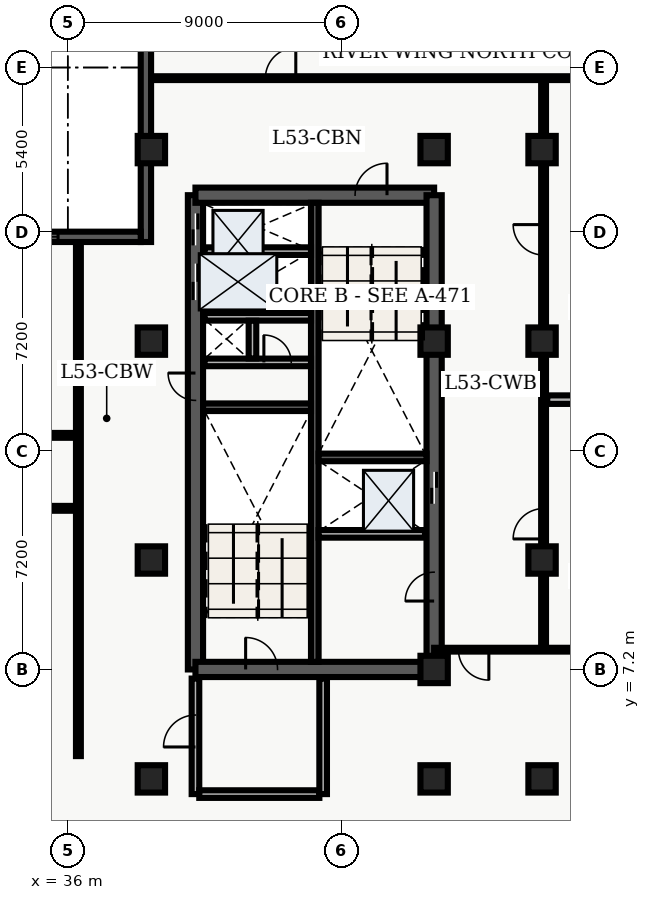
"""IFC4 building model, lengths in metres.
Left out: names, types, materials, properties, quantities, classifications, styles, units other than length and angle.
Written with IfcOpenShell. Run it as: python <this file> out.ifc"""

import sys

from ifc_helpers import new_model, entity, si_unit, converted_unit, direction, frame, origin_with_axes, origin_2d_with_axis, place, context, subcontext, project, spatial, polyline, rectangle, outline, extrude, element, fill, save


model = new_model("IFC4")
c1 = context("Model", 3, precision=1e-05, world=origin_with_axes(), true_north=direction((0.0, 1.0)))
c2 = subcontext(c1, "Body", "Model", "MODEL_VIEW")
j1 = project(units=[si_unit("LENGTHUNIT", "METRE"), converted_unit("PLANEANGLEUNIT", "DEGREE", entity("IfcPlaneAngleMeasure", 0.017), si_unit("PLANEANGLEUNIT", "RADIAN"), dimensions=[0, 0, 0, 0, 0, 0, 0])], contexts=[c1])
p1 = place(None, origin_with_axes())
s1 = spatial("IfcSite", under=j1, at=p1, CompositionType="ELEMENT")
p2 = place(p1, origin_with_axes())
s2 = spatial("IfcBuilding", under=s1, at=p2, CompositionType="ELEMENT")
p3 = place(p2, frame((0.0, 0.0, 216.0), z_axis=(0.0, 0.0, 1.0), x_axis=(1.0, 0.0, 0.0)))
s3 = spatial("IfcBuildingStorey", under=s2, at=p3, CompositionType="ELEMENT", Elevation=216.0)
p4 = place(p3, frame((40.2, 7.2, 0.0), z_axis=(0.0, 0.0, 1.0), x_axis=(0.0, 1.0, 0.0)))
e1 = element("IfcWall", 1, at=p4, inside=s3, PredefinedType="SHEAR", context=c2, shape_type="SweptSolid", body=[
    extrude(outline(polyline([(0.0, -0.25), (15.6, -0.25), (15.6, 0.25), (0.0, 0.25), (0.0, -0.25)])), origin_with_axes(), (0.0, 0.0, 1.0), 3.6),
])
p5 = place(p4, frame((14.475, 0.0, 0.0), z_axis=(0.0, 0.0, 1.0), x_axis=(1.0, 0.0, 0.0)))
e2 = element("IfcOpeningElement", 2, at=p5, cuts=e1, PredefinedType="OPENING", context=c2, shape_type="SweptSolid", body=[
    extrude(rectangle(XDim=1.05, YDim=0.52, at=origin_2d_with_axis()), origin_with_axes(), (0.0, 0.0, 1.0), 2.15),
])
p6 = place(p4, frame((12.75, 0.0, 0.0), z_axis=(0.0, 0.0, 1.0), x_axis=(1.0, 0.0, 0.0)))
e3 = element("IfcOpeningElement", 3, at=p6, cuts=e1, PredefinedType="OPENING", context=c2, shape_type="SweptSolid", body=[
    extrude(rectangle(XDim=1.2, YDim=0.52, at=origin_2d_with_axis()), origin_with_axes(), (0.0, 0.0, 1.0), 2.15),
])
p7 = place(p4, frame((9.3, 0.0, 0.0), z_axis=(0.0, 0.0, 1.0), x_axis=(1.0, 0.0, 0.0)))
e4 = element("IfcOpeningElement", 4, at=p7, cuts=e1, PredefinedType="OPENING", context=c2, shape_type="SweptSolid", body=[
    extrude(rectangle(XDim=0.9, YDim=0.52, at=origin_2d_with_axis()), origin_with_axes(), (0.0, 0.0, 1.0), 2.15),
])
p8 = place(p3, frame((40.2, 7.2, 0.0), z_axis=(0.0, 0.0, 1.0), x_axis=(1.0, 0.0, 0.0)))
e5 = element("IfcWall", 5, at=p8, inside=s3, PredefinedType="SHEAR", context=c2, shape_type="SweptSolid", body=[
    extrude(outline(polyline([(0.0, -0.25), (7.85, -0.25), (7.85, 0.25), (0.0, 0.25), (0.0, -0.25)])), origin_with_axes(), (0.0, 0.0, 1.0), 3.6),
])
p9 = place(p8, frame((2.175, 0.0, 0.0), z_axis=(0.0, 0.0, 1.0), x_axis=(1.0, 0.0, 0.0)))
e6 = element("IfcOpeningElement", 6, at=p9, cuts=e5, PredefinedType="OPENING", context=c2, shape_type="SweptSolid", body=[
    extrude(rectangle(XDim=1.05, YDim=0.52, at=origin_2d_with_axis()), origin_with_axes(), (0.0, 0.0, 1.0), 2.15),
])
p10 = place(p3, frame((40.2, 22.8, 0.0), z_axis=(0.0, 0.0, 1.0), x_axis=(1.0, 0.0, 0.0)))
e7 = element("IfcWall", 7, at=p10, inside=s3, PredefinedType="SHEAR", context=c2, shape_type="SweptSolid", body=[
    extrude(outline(polyline([(0.0, -0.25), (7.85, -0.25), (7.85, 0.25), (0.0, 0.25), (0.0, -0.25)])), origin_with_axes(), (0.0, 0.0, 1.0), 3.6),
])
p11 = place(p10, frame((5.775, 0.0, 0.0), z_axis=(0.0, 0.0, 1.0), x_axis=(1.0, 0.0, 0.0)))
e8 = element("IfcOpeningElement", 8, at=p11, cuts=e7, PredefinedType="OPENING", context=c2, shape_type="SweptSolid", body=[
    extrude(rectangle(XDim=1.05, YDim=0.52, at=origin_2d_with_axis()), origin_with_axes(), (0.0, 0.0, 1.0), 2.15),
])
p12 = place(p3, frame((48.05, 7.2, 0.0), z_axis=(0.0, 0.0, 1.0), x_axis=(0.0, 1.0, 0.0)))
e9 = element("IfcWall", 9, at=p12, inside=s3, PredefinedType="SHEAR", context=c2, shape_type="SweptSolid", body=[
    extrude(outline(polyline([(0.0, -0.25), (15.6, -0.25), (15.6, 0.25), (0.0, 0.25), (0.0, -0.25)])), origin_with_axes(), (0.0, 0.0, 1.0), 3.6),
])
p13 = place(p12, frame((5.975, 0.0, 0.0), z_axis=(0.0, 0.0, 1.0), x_axis=(1.0, 0.0, 0.0)))
e10 = element("IfcOpeningElement", 10, at=p13, cuts=e9, PredefinedType="OPENING", context=c2, shape_type="SweptSolid", body=[
    extrude(rectangle(XDim=1.05, YDim=0.52, at=origin_2d_with_axis()), origin_with_axes(), (0.0, 0.0, 1.0), 2.15),
])
p14 = place(p12, frame((2.725, 0.0, 0.0), z_axis=(0.0, 0.0, 1.0), x_axis=(1.0, 0.0, 0.0)))
e11 = element("IfcOpeningElement", 11, at=p14, cuts=e9, PredefinedType="OPENING", context=c2, shape_type="SweptSolid", body=[
    extrude(rectangle(XDim=0.95, YDim=0.52, at=origin_2d_with_axis()), origin_with_axes(), (0.0, 0.0, 1.0), 2.15),
])
p15 = place(p3, frame((44.125, 7.45, 0.0), z_axis=(0.0, 0.0, 1.0), x_axis=(0.0, 1.0, 0.0)))
e12 = element("IfcWall", 12, at=p15, inside=s3, PredefinedType="SHEAR", context=c2, shape_type="SweptSolid", body=[
    extrude(outline(polyline([(0.0, -0.125), (15.1, -0.125), (15.1, 0.125), (0.0, 0.125), (0.0, -0.125)])), origin_with_axes(), (0.0, 0.0, 1.0), 3.6),
])
for number, where, z_axis, x_axis in (
    (13, (40.45, 15.825, 0.0), (0.0, 0.0, 1.0), (1.0, 0.0, 0.0)),
    (14, (44.25, 14.175, 0.0), (0.0, 0.0, 1.0), (1.0, 0.0, 0.0)),
):
    element("IfcWall", number, at=place(p3, frame(where, z_axis=z_axis, x_axis=x_axis)), inside=s3, PredefinedType="SHEAR", context=c2, shape_type="SweptSolid", body=[
        extrude(outline(polyline([(0.0, -0.125), (3.55, -0.125), (3.55, 0.125), (0.0, 0.125), (0.0, -0.125)])), origin_with_axes(), (0.0, 0.0, 1.0), 3.6),
    ])
p16 = place(p3, frame((40.5, 17.3, 0.0), z_axis=(0.0, 0.0, 1.0), x_axis=(1.0, 0.0, 0.0)))
e15 = element("IfcWall", 15, at=p16, inside=s3, PredefinedType="SOLIDWALL", context=c2, shape_type="SweptSolid", body=[
    extrude(outline(polyline([(0.0, -0.125), (3.5, -0.125), (3.5, 0.125), (0.0, 0.125), (0.0, -0.125)])), origin_with_axes(), (0.0, 0.0, 1.0), 2.64),
])
p17 = place(p16, frame((2.4, 0.0, 0.0), z_axis=(0.0, 0.0, 1.0), x_axis=(1.0, 0.0, 0.0)))
e16 = element("IfcOpeningElement", 16, at=p17, cuts=e15, PredefinedType="OPENING", context=c2, shape_type="SweptSolid", body=[
    extrude(rectangle(XDim=0.9, YDim=0.27, at=origin_2d_with_axis()), origin_with_axes(), (0.0, 0.0, 1.0), 2.15),
])
p18 = place(p3, frame((40.5, 18.8, 0.0), z_axis=(0.0, 0.0, 1.0), x_axis=(1.0, 0.0, 0.0)))
e17 = element("IfcWall", 17, at=p18, inside=s3, PredefinedType="SOLIDWALL", context=c2, shape_type="SweptSolid", body=[
    extrude(outline(polyline([(0.0, -0.125), (3.5, -0.125), (3.5, 0.125), (0.0, 0.125), (0.0, -0.125)])), origin_with_axes(), (0.0, 0.0, 1.0), 2.64),
])
p19 = place(p3, frame((42.075, 17.43, 0.0), z_axis=(0.0, 0.0, 1.0), x_axis=(0.0, 1.0, 0.0)))
e18 = element("IfcWall", 18, at=p19, inside=s3, PredefinedType="SOLIDWALL", context=c2, shape_type="SweptSolid", body=[
    extrude(outline(polyline([(0.0, -0.125), (1.24, -0.125), (1.24, 0.125), (0.0, 0.125), (0.0, -0.125)])), origin_with_axes(), (0.0, 0.0, 1.0), 2.64),
])
p20 = place(p3, frame((40.2, 3.1, 0.0), z_axis=(0.0, 0.0, 1.0), x_axis=(0.0, 1.0, 0.0)))
e19 = element("IfcWall", 19, at=p20, inside=s3, PredefinedType="SOLIDWALL", context=c2, shape_type="SweptSolid", body=[
    extrude(outline(polyline([(0.0, -0.125), (3.8, -0.125), (3.8, 0.125), (0.0, 0.125), (0.0, -0.125)])), origin_with_axes(), (0.0, 0.0, 1.0), 2.64),
])
p21 = place(p20, frame((2.075, 0.0, 0.0), z_axis=(0.0, 0.0, 1.0), x_axis=(1.0, 0.0, 0.0)))
e20 = element("IfcOpeningElement", 20, at=p21, cuts=e19, PredefinedType="OPENING", context=c2, shape_type="SweptSolid", body=[
    extrude(rectangle(XDim=1.05, YDim=0.27, at=origin_2d_with_axis()), origin_with_axes(), (0.0, 0.0, 1.0), 2.15),
])
p22 = place(p3, frame((40.325, 3.1, 0.0), z_axis=(0.0, 0.0, 1.0), x_axis=(1.0, 0.0, 0.0)))
e21 = element("IfcWall", 21, at=p22, inside=s3, PredefinedType="SOLIDWALL", context=c2, shape_type="SweptSolid", body=[
    extrude(outline(polyline([(0.0, -0.125), (3.95, -0.125), (3.95, 0.125), (0.0, 0.125), (0.0, -0.125)])), origin_with_axes(), (0.0, 0.0, 1.0), 2.64),
])
p23 = place(p3, frame((44.4, 3.1, 0.0), z_axis=(0.0, 0.0, 1.0), x_axis=(0.0, 1.0, 0.0)))
e22 = element("IfcWall", 22, at=p23, inside=s3, PredefinedType="SOLIDWALL", context=c2, shape_type="SweptSolid", body=[
    extrude(outline(polyline([(0.0, -0.125), (3.8, -0.125), (3.8, 0.125), (0.0, 0.125), (0.0, -0.125)])), origin_with_axes(), (0.0, 0.0, 1.0), 2.64),
])
for number, where, z_axis, x_axis in (
    (23, (38.75, 3.6, 0.0), (0.0, 0.0, 1.0), (1.0, 0.0, 0.0)),
    (24, (38.75, 10.8, 0.0), (0.0, 0.0, 1.0), (1.0, 0.0, 0.0)),
    (25, (38.75, 18.0, 0.0), (0.0, 0.0, 1.0), (1.0, 0.0, 0.0)),
    (26, (38.75, 24.3, 0.0), (0.0, 0.0, 1.0), (1.0, 0.0, 0.0)),
    (27, (48.05, 3.6, 0.0), (0.0, 0.0, 1.0), (1.0, 0.0, 0.0)),
    (28, (48.05, 7.2, 0.0), (0.0, 0.0, 1.0), (1.0, 0.0, 0.0)),
    (29, (48.05, 18.0, 0.0), (0.0, 0.0, 1.0), (1.0, 0.0, 0.0)),
    (30, (48.05, 24.3, 0.0), (0.0, 0.0, 1.0), (1.0, 0.0, 0.0)),
    (31, (51.6, 3.6, 0.0), (0.0, 0.0, 1.0), (1.0, 0.0, 0.0)),
    (32, (51.6, 10.8, 0.0), (0.0, 0.0, 1.0), (1.0, 0.0, 0.0)),
    (33, (51.6, 18.0, 0.0), (0.0, 0.0, 1.0), (1.0, 0.0, 0.0)),
    (34, (51.6, 24.3, 0.0), (0.0, 0.0, 1.0), (1.0, 0.0, 0.0)),
):
    element("IfcColumn", number, at=place(p3, frame(where, z_axis=z_axis, x_axis=x_axis)), inside=s3, PredefinedType="COLUMN", context=c2, shape_type="SweptSolid", body=[
        extrude(rectangle(XDim=0.9, YDim=0.9, at=origin_2d_with_axis()), origin_with_axes(), (0.0, 0.0, 1.0), 3.9),
    ])
for number, where, z_axis, x_axis in (
    (35, (40.5, 20.96, 0.0), (0.0, 0.0, 1.0), (1.0, 0.0, 0.0)),
    (36, (44.25, 11.66, 0.0), (0.0, 0.0, 1.0), (1.0, 0.0, 0.0)),
):
    element("IfcWall", number, at=place(p3, frame(where, z_axis=z_axis, x_axis=x_axis)), inside=s3, PredefinedType="SOLIDWALL", context=c2, shape_type="SweptSolid", body=[
        extrude(outline(polyline([(0.0, -0.125), (3.5, -0.125), (3.5, 0.125), (0.0, 0.125), (0.0, -0.125)])), origin_with_axes(), (0.0, 0.0, 1.0), 2.64),
    ])
p24 = place(p3, frame((21.15, 12.5, 0.0), z_axis=(0.0, 0.0, 1.0), x_axis=(1.0, 0.0, 0.0)))
e37 = element("IfcWall", 37, at=p24, inside=s3, PredefinedType="PARTITIONING", context=c2, shape_type="SweptSolid", body=[
    extrude(outline(polyline([(0.0, -0.08), (15.2, -0.08), (15.2, 0.08), (0.0, 0.08), (0.0, -0.08)])), origin_with_axes(), (0.0, 0.0, 1.0), 2.64),
])
p25 = place(p24, frame((7.65, 0.0, 0.0), z_axis=(0.0, 0.0, 1.0), x_axis=(1.0, 0.0, 0.0)))
e38 = element("IfcOpeningElement", 38, at=p25, cuts=e37, PredefinedType="OPENING", context=c2, shape_type="SweptSolid", body=[
    extrude(rectangle(XDim=1.2, YDim=0.18, at=origin_2d_with_axis()), origin_with_axes(), (0.0, 0.0, 1.0), 2.2),
])
p26 = place(p3, frame((21.15, 14.9, 0.0), z_axis=(0.0, 0.0, 1.0), x_axis=(1.0, 0.0, 0.0)))
e39 = element("IfcWall", 39, at=p26, inside=s3, PredefinedType="PARTITIONING", context=c2, shape_type="SweptSolid", body=[
    extrude(outline(polyline([(0.0, -0.08), (15.2, -0.08), (15.2, 0.08), (0.0, 0.08), (0.0, -0.08)])), origin_with_axes(), (0.0, 0.0, 1.0), 2.64),
])
p27 = place(p26, frame((1.964, 0.0, 0.0), z_axis=(0.0, 0.0, 1.0), x_axis=(1.0, 0.0, 0.0)))
e40 = element("IfcOpeningElement", 40, at=p27, cuts=e39, PredefinedType="OPENING", context=c2, shape_type="SweptSolid", body=[
    extrude(rectangle(XDim=1.0, YDim=0.18, at=origin_2d_with_axis()), origin_with_axes(), (0.0, 0.0, 1.0), 2.15),
])
p28 = place(p26, frame((5.099, 0.0, 0.0), z_axis=(0.0, 0.0, 1.0), x_axis=(1.0, 0.0, 0.0)))
e41 = element("IfcOpeningElement", 41, at=p28, cuts=e39, PredefinedType="OPENING", context=c2, shape_type="SweptSolid", body=[
    extrude(rectangle(XDim=1.0, YDim=0.18, at=origin_2d_with_axis()), origin_with_axes(), (0.0, 0.0, 1.0), 2.15),
])
p29 = place(p26, frame((9.279, 0.0, 0.0), z_axis=(0.0, 0.0, 1.0), x_axis=(1.0, 0.0, 0.0)))
e42 = element("IfcOpeningElement", 42, at=p29, cuts=e39, PredefinedType="OPENING", context=c2, shape_type="SweptSolid", body=[
    extrude(rectangle(XDim=1.0, YDim=0.18, at=origin_2d_with_axis()), origin_with_axes(), (0.0, 0.0, 1.0), 2.15),
])
p30 = place(p26, frame((13.614, 0.0, 0.0), z_axis=(0.0, 0.0, 1.0), x_axis=(1.0, 0.0, 0.0)))
e43 = element("IfcOpeningElement", 43, at=p30, cuts=e39, PredefinedType="OPENING", context=c2, shape_type="SweptSolid", body=[
    extrude(rectangle(XDim=1.0, YDim=0.18, at=origin_2d_with_axis()), origin_with_axes(), (0.0, 0.0, 1.0), 2.15),
])
p31 = place(p3, frame((36.35, 4.35, 0.0), z_axis=(0.0, 0.0, 1.0), x_axis=(0.0, 1.0, 0.0)))
e44 = element("IfcWall", 44, at=p31, inside=s3, PredefinedType="PARTITIONING", context=c2, shape_type="SweptSolid", body=[
    extrude(outline(polyline([(0.0, -0.08), (16.95, -0.08), (16.95, 0.08), (0.0, 0.08), (0.0, -0.08)])), origin_with_axes(), (0.0, 0.0, 1.0), 2.64),
])
p32 = place(p3, frame((51.65, 7.85, 0.0), z_axis=(0.0, 0.0, 1.0), x_axis=(0.0, 1.0, 0.0)))
e45 = element("IfcWall", 45, at=p32, inside=s3, PredefinedType="PARTITIONING", context=c2, shape_type="SweptSolid", body=[
    extrude(outline(polyline([(0.0, -0.08), (18.8, -0.08), (18.8, 0.08), (0.0, 0.08), (0.0, -0.08)])), origin_with_axes(), (0.0, 0.0, 1.0), 2.64),
])
p33 = place(p32, frame((4.143, 0.0, 0.0), z_axis=(0.0, 0.0, 1.0), x_axis=(1.0, 0.0, 0.0)))
e46 = element("IfcOpeningElement", 46, at=p33, cuts=e45, PredefinedType="OPENING", context=c2, shape_type="SweptSolid", body=[
    extrude(rectangle(XDim=1.0, YDim=0.18, at=origin_2d_with_axis()), origin_with_axes(), (0.0, 0.0, 1.0), 2.15),
])
p34 = place(p32, frame((13.482, 0.0, 0.0), z_axis=(0.0, 0.0, 1.0), x_axis=(1.0, 0.0, 0.0)))
e47 = element("IfcOpeningElement", 47, at=p34, cuts=e45, PredefinedType="OPENING", context=c2, shape_type="SweptSolid", body=[
    extrude(rectangle(XDim=1.0, YDim=0.18, at=origin_2d_with_axis()), origin_with_axes(), (0.0, 0.0, 1.0), 2.15),
])
p35 = place(p3, frame((59.665, 7.85, 0.0), z_axis=(0.0, 0.0, 1.0), x_axis=(-1.0, 0.0, 0.0)))
e48 = element("IfcWall", 48, at=p35, inside=s3, PredefinedType="PARTITIONING", context=c2, shape_type="SweptSolid", body=[
    extrude(outline(polyline([(0.0, -0.062), (11.615, -0.062), (11.615, 0.062), (0.0, 0.062), (0.0, -0.062)])), origin_with_axes(), (0.0, 0.0, 1.0), 2.64),
])
p36 = place(p35, frame((10.315, 0.0, 0.0), z_axis=(0.0, 0.0, 1.0), x_axis=(1.0, 0.0, 0.0)))
e49 = element("IfcOpeningElement", 49, at=p36, cuts=e48, PredefinedType="OPENING", context=c2, shape_type="SweptSolid", body=[
    extrude(rectangle(XDim=1.0, YDim=0.145, at=origin_2d_with_axis()), origin_with_axes(), (0.0, 0.0, 1.0), 2.15),
])
p37 = place(p3, frame((38.735, 26.65, 0.0), z_axis=(0.0, 0.0, 1.0), x_axis=(1.0, 0.0, 0.0)))
e50 = element("IfcWall", 50, at=p37, inside=s3, PredefinedType="PARTITIONING", context=c2, shape_type="SweptSolid", body=[
    extrude(outline(polyline([(0.0, -0.062), (20.905, -0.062), (20.905, 0.062), (0.0, 0.062), (0.0, -0.062)])), origin_with_axes(), (0.0, 0.0, 1.0), 2.64),
])
p38 = place(p37, frame((4.265, 0.0, 0.0), z_axis=(0.0, 0.0, 1.0), x_axis=(1.0, 0.0, 0.0)))
e51 = element("IfcOpeningElement", 51, at=p38, cuts=e50, PredefinedType="OPENING", context=c2, shape_type="SweptSolid", body=[
    extrude(rectangle(XDim=1.0, YDim=0.145, at=origin_2d_with_axis()), origin_with_axes(), (0.0, 0.0, 1.0), 2.15),
])
p39 = place(p3, frame((51.77, 16.075, 0.0), z_axis=(0.0, 0.0, 1.0), x_axis=(1.0, 0.0, 0.0)))
e52 = element("IfcWall", 52, at=p39, inside=s3, PredefinedType="PARTITIONING", context=c2, shape_type="SweptSolid", body=[
    extrude(outline(polyline([(0.0, -0.14), (7.895, -0.14), (7.895, 0.14), (0.0, 0.14), (0.0, -0.14)])), origin_with_axes(), (0.0, 0.0, 1.0), 2.64),
])
p40 = place(p3, frame((38.57, 21.26, 0.0), z_axis=(0.0, 0.0, 1.0), x_axis=(0.0, 1.0, 0.0)))
e53 = element("IfcWall", 53, at=p40, inside=s3, PredefinedType="SOLIDWALL", context=c2, shape_type="SweptSolid", body=[
    extrude(outline(polyline([(0.0, -0.17), (7.54, -0.17), (7.54, 0.17), (0.0, 0.17), (0.0, -0.17)])), origin_with_axes(), (0.0, 0.0, 1.0), 3.6),
])
p41 = place(p3, frame((32.06, 21.43, 0.0), z_axis=(0.0, 0.0, 1.0), x_axis=(1.0, 0.0, 0.0)))
e54 = element("IfcWall", 54, at=p41, inside=s3, PredefinedType="SOLIDWALL", context=c2, shape_type="SweptSolid", body=[
    extrude(outline(polyline([(0.0, -0.17), (6.34, -0.17), (6.34, 0.17), (0.0, 0.17), (0.0, -0.17)])), origin_with_axes(), (0.0, 0.0, 1.0), 3.6),
])
p42 = place(p41, frame((2.72, 0.0, 0.45), z_axis=(0.0, 0.0, 1.0), x_axis=(1.0, 0.0, 0.0)))
e55 = element("IfcOpeningElement", 55, at=p42, cuts=e54, PredefinedType="OPENING", context=c2, shape_type="SweptSolid", body=[
    extrude(rectangle(XDim=1.8, YDim=0.36, at=origin_2d_with_axis()), origin_with_axes(), (0.0, 0.0, 1.0), 2.1),
])
p43 = place(p12, frame((5.975, 0.0, 0.0), z_axis=(0.0, 0.0, 1.0), x_axis=(1.0, 0.0, 0.0)))
e56 = element("IfcDoor", 56, at=p43, inside=s3, OperationType="SLIDING_TO_LEFT", PredefinedType="DOOR", context=c2, shape_type="SweptSolid", body=[
    extrude(rectangle(XDim=1.05, YDim=0.09, at=origin_2d_with_axis()), origin_with_axes(), (0.0, 0.0, 1.0), 2.15),
])
fill(e10, e56)
p44 = place(p4, frame((14.475, 0.0, 0.0), z_axis=(0.0, 0.0, 1.0), x_axis=(1.0, 0.0, 0.0)))
e57 = element("IfcDoor", 57, at=p44, inside=s3, OperationType="SLIDING_TO_RIGHT", PredefinedType="DOOR", context=c2, shape_type="SweptSolid", body=[
    extrude(rectangle(XDim=1.05, YDim=0.09, at=origin_2d_with_axis()), origin_with_axes(), (0.0, 0.0, 1.0), 2.15),
])
fill(e2, e57)
p45 = place(p4, frame((12.75, 0.0, 0.0), z_axis=(0.0, 0.0, 1.0), x_axis=(1.0, 0.0, 0.0)))
e58 = element("IfcDoor", 58, at=p45, inside=s3, OperationType="DOUBLE_DOOR_SLIDING", PredefinedType="DOOR", context=c2, shape_type="SweptSolid", body=[
    extrude(rectangle(XDim=1.2, YDim=0.09, at=origin_2d_with_axis()), origin_with_axes(), (0.0, 0.0, 1.0), 2.15),
])
fill(e3, e58)
p46 = place(p4, frame((9.3, 0.0, 0.0), z_axis=(0.0, 0.0, 1.0), x_axis=(1.0, 0.0, 0.0)))
e59 = element("IfcDoor", 59, at=p46, inside=s3, OperationType="SINGLE_SWING_RIGHT", PredefinedType="DOOR", context=c2, shape_type="SweptSolid", body=[
    extrude(rectangle(XDim=0.9, YDim=0.09, at=origin_2d_with_axis()), origin_with_axes(), (0.0, 0.0, 1.0), 2.15),
])
fill(e4, e59)
p47 = place(p16, frame((2.4, 0.0, 0.0), z_axis=(0.0, 0.0, 1.0), x_axis=(1.0, 0.0, 0.0)))
e60 = element("IfcDoor", 60, at=p47, inside=s3, OperationType="SINGLE_SWING_LEFT", PredefinedType="DOOR", context=c2, shape_type="SweptSolid", body=[
    extrude(rectangle(XDim=0.9, YDim=0.09, at=origin_2d_with_axis()), origin_with_axes(), (0.0, 0.0, 1.0), 2.15),
])
fill(e16, e60)
p48 = place(p8, frame((2.175, 0.0, 0.0), z_axis=(0.0, 0.0, 1.0), x_axis=(1.0, 0.0, 0.0)))
e61 = element("IfcDoor", 61, at=p48, inside=s3, OperationType="SINGLE_SWING_LEFT", PredefinedType="DOOR", context=c2, shape_type="SweptSolid", body=[
    extrude(rectangle(XDim=1.05, YDim=0.09, at=origin_2d_with_axis()), origin_with_axes(), (0.0, 0.0, 1.0), 2.15),
])
fill(e6, e61)
p49 = place(p10, frame((5.775, 0.0, 0.0), z_axis=(0.0, 0.0, 1.0), x_axis=(1.0, 0.0, 0.0)))
e62 = element("IfcDoor", 62, at=p49, inside=s3, OperationType="SINGLE_SWING_RIGHT", PredefinedType="DOOR", context=c2, shape_type="SweptSolid", body=[
    extrude(rectangle(XDim=1.05, YDim=0.09, at=origin_2d_with_axis()), origin_with_axes(), (0.0, 0.0, 1.0), 2.15),
])
fill(e8, e62)
p50 = place(p20, frame((2.075, 0.0, 0.0), z_axis=(0.0, 0.0, 1.0), x_axis=(1.0, 0.0, 0.0)))
e63 = element("IfcDoor", 63, at=p50, inside=s3, OperationType="SINGLE_SWING_LEFT", PredefinedType="DOOR", context=c2, shape_type="SweptSolid", body=[
    extrude(rectangle(XDim=1.05, YDim=0.09, at=origin_2d_with_axis()), origin_with_axes(), (0.0, 0.0, 1.0), 2.15),
])
fill(e20, e63)
p51 = place(p12, frame((2.725, 0.0, 0.0), z_axis=(0.0, 0.0, 1.0), x_axis=(1.0, 0.0, 0.0)))
e64 = element("IfcDoor", 64, at=p51, inside=s3, OperationType="SINGLE_SWING_LEFT", PredefinedType="DOOR", context=c2, shape_type="SweptSolid", body=[
    extrude(rectangle(XDim=0.95, YDim=0.09, at=origin_2d_with_axis()), origin_with_axes(), (0.0, 0.0, 1.0), 2.15),
])
fill(e11, e64)
p52 = place(p35, frame((10.315, 0.0, 0.0), z_axis=(0.0, 0.0, 1.0), x_axis=(1.0, 0.0, 0.0)))
e65 = element("IfcDoor", 65, at=p52, inside=s3, OperationType="SINGLE_SWING_LEFT", PredefinedType="DOOR", context=c2, shape_type="SweptSolid", body=[
    extrude(rectangle(XDim=1.0, YDim=0.075, at=origin_2d_with_axis()), origin_with_axes(), (0.0, 0.0, 1.0), 2.15),
])
fill(e49, e65)
p53 = place(p37, frame((4.265, 0.0, 0.0), z_axis=(0.0, 0.0, 1.0), x_axis=(1.0, 0.0, 0.0)))
e66 = element("IfcDoor", 66, at=p53, inside=s3, OperationType="SINGLE_SWING_RIGHT", PredefinedType="DOOR", context=c2, shape_type="SweptSolid", body=[
    extrude(rectangle(XDim=1.0, YDim=0.075, at=origin_2d_with_axis()), origin_with_axes(), (0.0, 0.0, 1.0), 2.15),
])
fill(e51, e66)
p54 = place(p32, frame((4.143, 0.0, 0.0), z_axis=(0.0, 0.0, 1.0), x_axis=(1.0, 0.0, 0.0)))
e67 = element("IfcDoor", 67, at=p54, inside=s3, OperationType="SINGLE_SWING_LEFT", PredefinedType="DOOR", context=c2, shape_type="SweptSolid", body=[
    extrude(rectangle(XDim=1.0, YDim=0.09, at=origin_2d_with_axis()), origin_with_axes(), (0.0, 0.0, 1.0), 2.15),
])
fill(e46, e67)
p55 = place(p32, frame((13.482, 0.0, 0.0), z_axis=(0.0, 0.0, 1.0), x_axis=(1.0, 0.0, 0.0)))
e68 = element("IfcDoor", 68, at=p55, inside=s3, OperationType="SINGLE_SWING_RIGHT", PredefinedType="DOOR", context=c2, shape_type="SweptSolid", body=[
    extrude(rectangle(XDim=1.0, YDim=0.09, at=origin_2d_with_axis()), origin_with_axes(), (0.0, 0.0, 1.0), 2.15),
])
fill(e47, e68)
p56 = place(p41, frame((2.72, 0.0, 0.45), z_axis=(0.0, 0.0, 1.0), x_axis=(1.0, 0.0, 0.0)))
e69 = element("IfcWindow", 69, at=p56, inside=s3, PredefinedType="WINDOW", context=c2, shape_type="SweptSolid", body=[
    extrude(rectangle(XDim=1.8, YDim=0.09, at=origin_2d_with_axis()), origin_with_axes(), (0.0, 0.0, 1.0), 2.1),
])
fill(e55, e69)
save(model, sys.argv[1])
